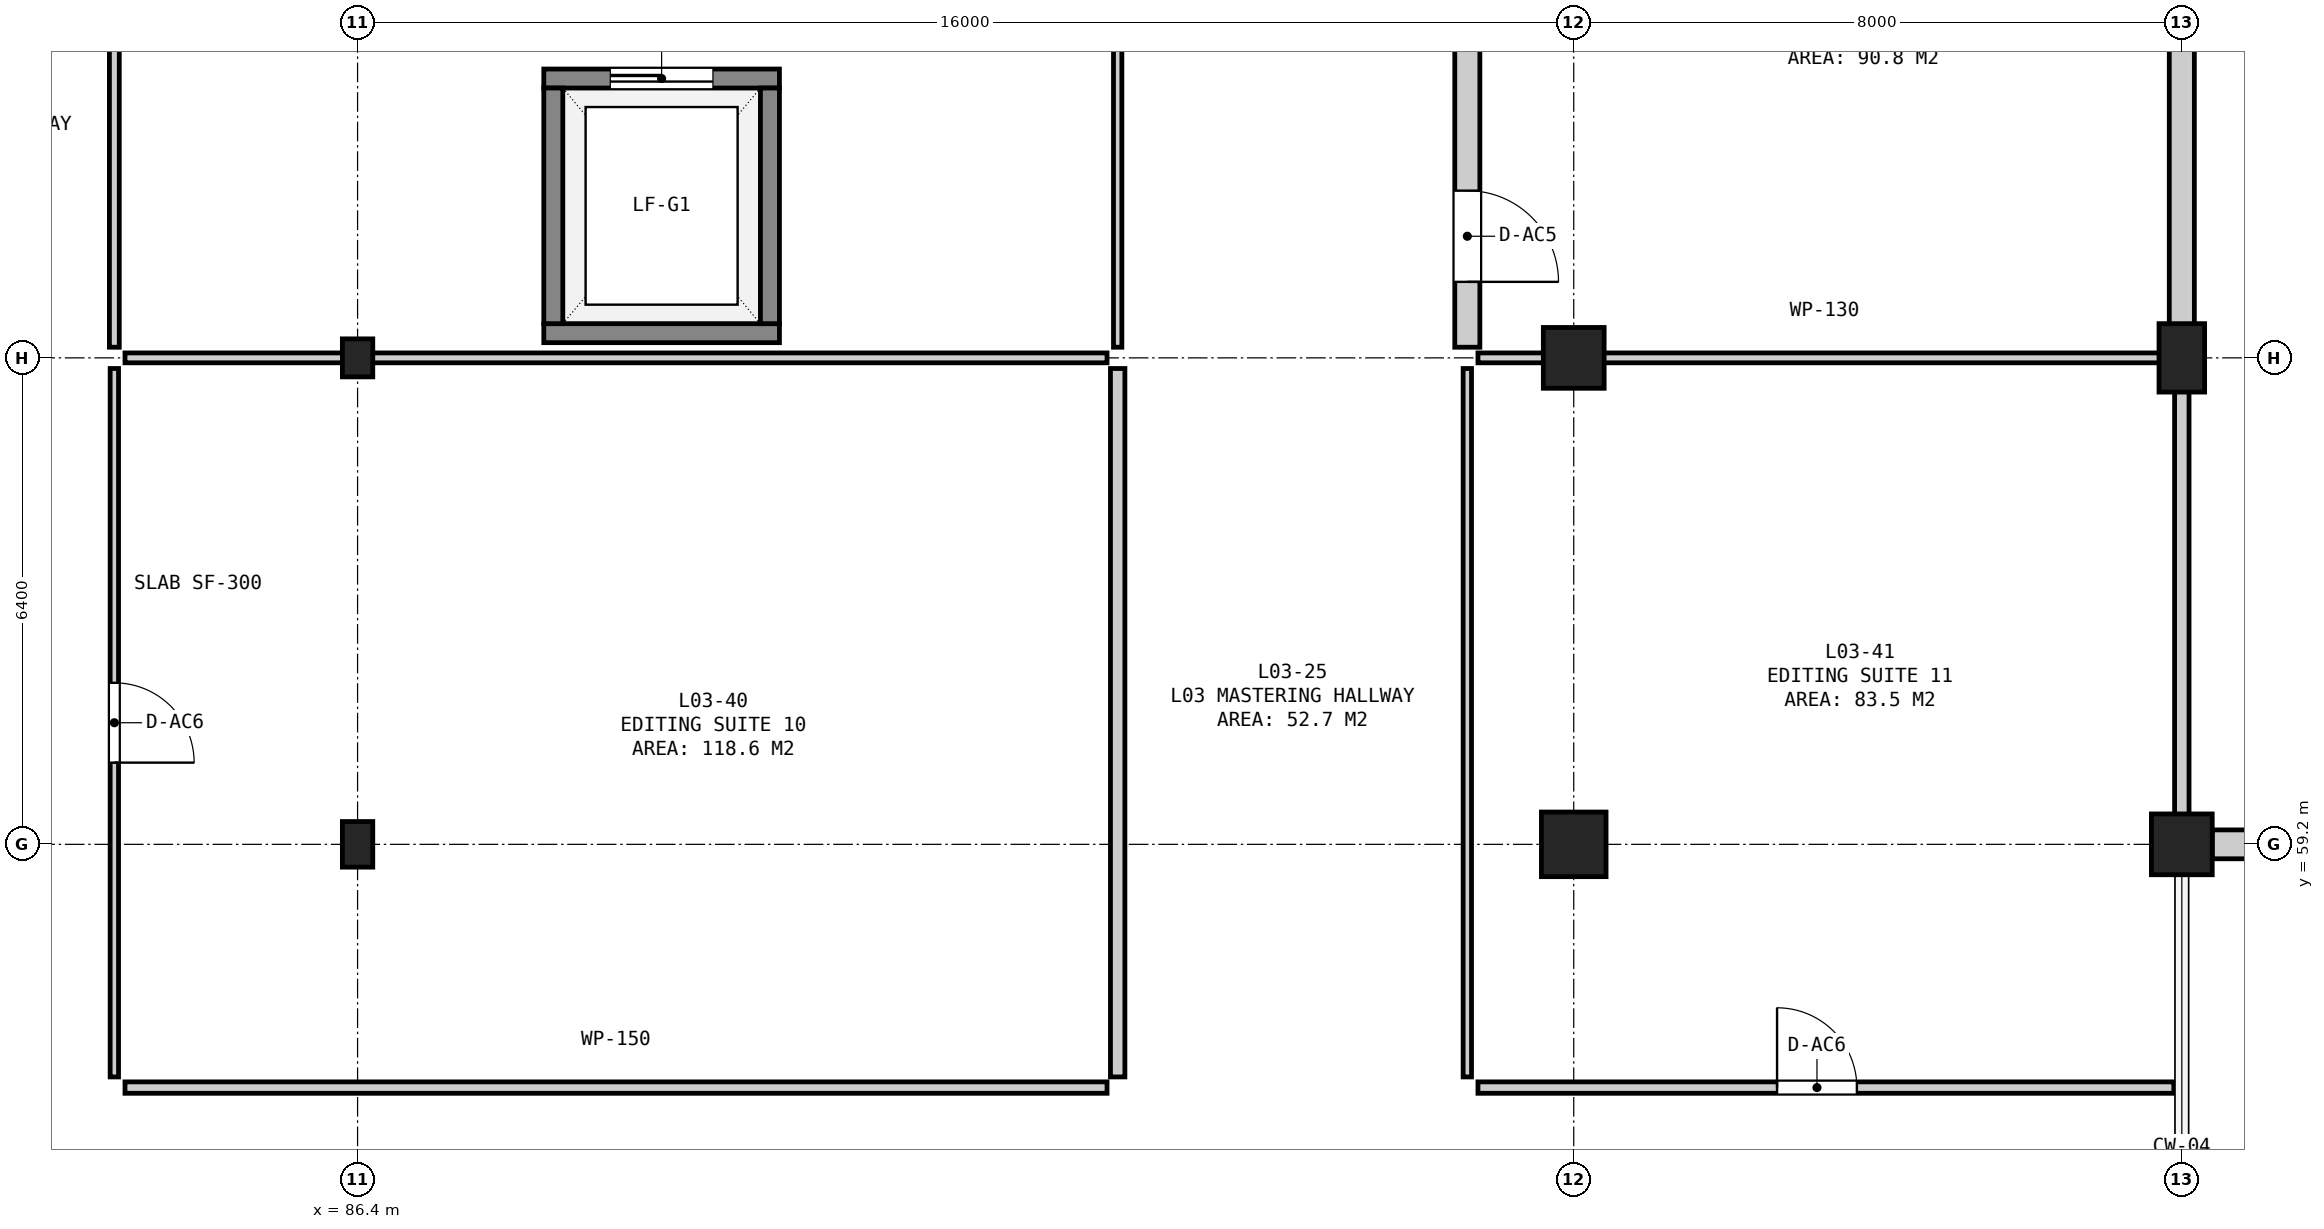
"""IFC4 building model, lengths in metres.
Left out: names, types, materials, properties, quantities, classifications, styles, units other than length and angle.
Written with IfcOpenShell. Run it as: python <this file> out.ifc"""

import sys

from ifc_helpers import new_model, si_unit, direction, frame, frame_2d, origin, origin_2d, place, context, subcontext, project, spatial, rectangle, extrude, element, fill, save


model = new_model("IFC4")
c1 = context("Model", 3, precision=1e-05, world=origin(), true_north=direction((0.0, 1.0)))
c2 = subcontext(c1, "Body", "Model", "MODEL_VIEW")
j1 = project(units=[si_unit("LENGTHUNIT", "METRE"), si_unit("PLANEANGLEUNIT", "RADIAN")], contexts=[c1])
p1 = place(None, origin())
s1 = spatial("IfcSite", under=j1, at=p1, CompositionType="ELEMENT")
p2 = place(p1, origin())
s2 = spatial("IfcBuilding", under=s1, at=p2, CompositionType="ELEMENT")
p3 = place(p2, frame((0.0, 0.0, 15.6)))
s3 = spatial("IfcBuildingStorey", under=s2, at=p3, CompositionType="ELEMENT", Elevation=15.6)
p4 = place(p3, frame((86.4, 59.2, 0.0), z_axis=(0.0, 0.0, 1.0), x_axis=(1.0, 0.0, 0.0)))
e1 = element("IfcColumn", 1, at=p4, inside=s3, PredefinedType="COLUMN", context=c2, shape_type="SweptSolid", body=[
    extrude(rectangle(XDim=0.4, YDim=0.6, at=origin_2d()), origin(), (0.0, 0.0, 1.0), 4.2),
])
p5 = place(p3, frame((86.4, 65.6, 0.0), z_axis=(0.0, 0.0, 1.0), x_axis=(1.0, 0.0, 0.0)))
e2 = element("IfcColumn", 2, at=p5, inside=s3, PredefinedType="COLUMN", context=c2, shape_type="SweptSolid", body=[
    extrude(rectangle(XDim=0.4, YDim=0.5, at=origin_2d()), origin(), (0.0, 0.0, 1.0), 4.2),
])
p6 = place(p3, frame((102.4, 59.2, 0.0), z_axis=(0.0, 0.0, 1.0), x_axis=(1.0, 0.0, 0.0)))
e3 = element("IfcColumn", 3, at=p6, inside=s3, PredefinedType="COLUMN", context=c2, shape_type="SweptSolid", body=[
    extrude(rectangle(XDim=0.85, YDim=0.85, at=origin_2d()), origin(), (0.0, 0.0, 1.0), 4.2),
])
for number, where, z_axis, x_axis in (
    (4, (102.4, 65.6, 0.0), (0.0, 0.0, 1.0), (1.0, 0.0, 0.0)),
    (5, (110.4, 59.2, 0.0), (0.0, 0.0, 1.0), (1.0, 0.0, 0.0)),
):
    element("IfcColumn", number, at=place(p3, frame(where, z_axis=z_axis, x_axis=x_axis)), inside=s3, PredefinedType="COLUMN", context=c2, shape_type="SweptSolid", body=[
        extrude(rectangle(XDim=0.8, YDim=0.8, at=origin_2d()), origin(), (0.0, 0.0, 1.0), 4.2),
    ])
p7 = place(p3, frame((110.4, 65.6, 0.0), z_axis=(0.0, 0.0, 1.0), x_axis=(1.0, 0.0, 0.0)))
e6 = element("IfcColumn", 6, at=p7, inside=s3, PredefinedType="COLUMN", context=c2, shape_type="SweptSolid", body=[
    extrude(rectangle(XDim=0.6, YDim=0.9, at=origin_2d()), origin(), (0.0, 0.0, 1.0), 4.2),
])
p8 = place(p3, frame((110.8, 59.2, 0.0), z_axis=(0.0, 0.0, 1.0), x_axis=(1.0, 0.0, 0.0)))
e7 = element("IfcWall", 7, at=p8, inside=s3, PredefinedType="SOLIDWALL", context=c2, shape_type="SweptSolid", body=[
    extrude(rectangle(XDim=5.625, YDim=0.38, at=frame_2d((2.812, 0.0))), origin(), (0.0, 0.0, 1.0), 3.3),
])
p9 = place(p8, frame((2.188, 0.0, 0.9)))
e8 = element("IfcOpeningElement", 8, at=p9, cuts=e7, PredefinedType="OPENING", context=c2, shape_type="SweptSolid", body=[
    extrude(rectangle(XDim=1.25, YDim=1.9, at=frame_2d((0.625, 0.95))), frame((0.0, 0.202, 0.0), z_axis=(0.0, -1.0, 0.0), x_axis=(1.0, 0.0, 0.0)), (0.0, 0.0, 1.0), 0.404),
])
p10 = place(p3, frame((88.85, 65.925, 0.0), z_axis=(0.0, 0.0, 1.0), x_axis=(1.0, 0.0, 0.0)))
e9 = element("IfcWall", 9, at=p10, inside=s3, PredefinedType="SHEAR", context=c2, shape_type="SweptSolid", body=[
    extrude(rectangle(XDim=3.1, YDim=0.25, at=frame_2d((1.55, 0.0))), origin(), (0.0, 0.0, 1.0), 3.9),
])
p11 = place(p3, frame((88.85, 69.275, 0.0), z_axis=(0.0, 0.0, 1.0), x_axis=(1.0, 0.0, 0.0)))
e10 = element("IfcWall", 10, at=p11, inside=s3, PredefinedType="SHEAR", context=c2, shape_type="SweptSolid", body=[
    extrude(rectangle(XDim=3.1, YDim=0.25, at=frame_2d((1.55, 0.0))), origin(), (0.0, 0.0, 1.0), 3.9),
])
p12 = place(p11, frame((0.875, 0.0, 0.0)))
e11 = element("IfcOpeningElement", 11, at=p12, cuts=e10, PredefinedType="OPENING", context=c2, shape_type="SweptSolid", body=[
    extrude(rectangle(XDim=1.35, YDim=2.2, at=frame_2d((0.675, 1.1))), frame((0.0, 0.137, 0.0), z_axis=(0.0, -1.0, 0.0), x_axis=(1.0, 0.0, 0.0)), (0.0, 0.0, 1.0), 0.274),
])
for number, where, z_axis, x_axis in (
    (12, (88.975, 66.05, 0.0), (0.0, 0.0, 1.0), (0.0, 1.0, 0.0)),
    (13, (91.825, 66.05, 0.0), (0.0, 0.0, 1.0), (0.0, 1.0, 0.0)),
):
    element("IfcWall", number, at=place(p3, frame(where, z_axis=z_axis, x_axis=x_axis)), inside=s3, PredefinedType="SHEAR", context=c2, shape_type="SweptSolid", body=[
        extrude(rectangle(XDim=3.1, YDim=0.25, at=frame_2d((1.55, 0.0))), origin(), (0.0, 0.0, 1.0), 3.9),
    ])
p13 = place(p3, frame((83.34, 56.0, 0.0), z_axis=(0.0, 0.0, 1.0), x_axis=(1.0, 0.0, 0.0)))
e14 = element("IfcWall", 14, at=p13, inside=s3, PredefinedType="PARTITIONING", context=c2, shape_type="SweptSolid", body=[
    extrude(rectangle(XDim=12.92, YDim=0.15, at=frame_2d((6.46, 0.0))), origin(), (0.0, 0.0, 1.0), 3.9),
])
p14 = place(p3, frame((83.34, 65.6, 0.0), z_axis=(0.0, 0.0, 1.0), x_axis=(1.0, 0.0, 0.0)))
e15 = element("IfcWall", 15, at=p14, inside=s3, PredefinedType="PARTITIONING", context=c2, shape_type="SweptSolid", body=[
    extrude(rectangle(XDim=12.92, YDim=0.13, at=frame_2d((6.46, 0.0))), origin(), (0.0, 0.0, 1.0), 2.745),
])
p15 = place(p3, frame((83.2, 56.14, 0.0), z_axis=(0.0, 0.0, 1.0), x_axis=(0.0, 1.0, 0.0)))
e16 = element("IfcWall", 16, at=p15, inside=s3, PredefinedType="PARTITIONING", context=c2, shape_type="SweptSolid", body=[
    extrude(rectangle(XDim=9.32, YDim=0.11, at=frame_2d((4.66, 0.0))), origin(), (0.0, 0.0, 1.0), 3.9),
])
p16 = place(p15, frame((4.135, 0.0, 0.0)))
e17 = element("IfcOpeningElement", 17, at=p16, cuts=e16, PredefinedType="OPENING", context=c2, shape_type="SweptSolid", body=[
    extrude(rectangle(XDim=1.05, YDim=2.15, at=frame_2d((0.525, 1.075))), frame((0.0, 0.067, 0.0), z_axis=(0.0, -1.0, 0.0), x_axis=(1.0, 0.0, 0.0)), (0.0, 0.0, 1.0), 0.134),
])
p17 = place(p3, frame((96.4, 56.14, 0.0), z_axis=(0.0, 0.0, 1.0), x_axis=(0.0, 1.0, 0.0)))
e18 = element("IfcWall", 18, at=p17, inside=s3, PredefinedType="PARTITIONING", context=c2, shape_type="SweptSolid", body=[
    extrude(rectangle(XDim=9.32, YDim=0.19, at=frame_2d((4.66, 0.0))), origin(), (0.0, 0.0, 1.0), 3.9),
])
p18 = place(p3, frame((101.14, 56.0, 0.0), z_axis=(0.0, 0.0, 1.0), x_axis=(1.0, 0.0, 0.0)))
e19 = element("IfcWall", 19, at=p18, inside=s3, PredefinedType="PARTITIONING", context=c2, shape_type="SweptSolid", body=[
    extrude(rectangle(XDim=9.155, YDim=0.15, at=frame_2d((4.578, 0.0))), origin(), (0.0, 0.0, 1.0), 3.9),
])
p19 = place(p18, frame((3.935, 0.0, 0.0)))
e20 = element("IfcOpeningElement", 20, at=p19, cuts=e19, PredefinedType="OPENING", context=c2, shape_type="SweptSolid", body=[
    extrude(rectangle(XDim=1.05, YDim=2.15, at=frame_2d((0.525, 1.075))), frame((0.0, 0.087, 0.0), z_axis=(0.0, -1.0, 0.0), x_axis=(1.0, 0.0, 0.0)), (0.0, 0.0, 1.0), 0.174),
])
p20 = place(p3, frame((101.14, 65.6, 0.0), z_axis=(0.0, 0.0, 1.0), x_axis=(1.0, 0.0, 0.0)))
e21 = element("IfcWall", 21, at=p20, inside=s3, PredefinedType="PARTITIONING", context=c2, shape_type="SweptSolid", body=[
    extrude(rectangle(XDim=9.12, YDim=0.13, at=frame_2d((4.56, 0.0))), origin(), (0.0, 0.0, 1.0), 2.745),
])
p21 = place(p3, frame((101.0, 56.14, 0.0), z_axis=(0.0, 0.0, 1.0), x_axis=(0.0, 1.0, 0.0)))
e22 = element("IfcWall", 22, at=p21, inside=s3, PredefinedType="PARTITIONING", context=c2, shape_type="SweptSolid", body=[
    extrude(rectangle(XDim=9.32, YDim=0.11, at=frame_2d((4.66, 0.0))), origin(), (0.0, 0.0, 1.0), 3.9),
])
p22 = place(p3, frame((110.4, 58.94, 0.0), z_axis=(0.0, 0.0, 1.0), x_axis=(0.0, 1.0, 0.0)))
e23 = element("IfcWall", 23, at=p22, inside=s3, PredefinedType="PARTITIONING", context=c2, shape_type="SweptSolid", body=[
    extrude(rectangle(XDim=6.52, YDim=0.19, at=frame_2d((3.26, 0.0))), origin(), (0.0, 0.0, 1.0), 3.195),
])
p23 = place(p3, frame((83.2, 65.74, 0.0), z_axis=(0.0, 0.0, 1.0), x_axis=(0.0, 1.0, 0.0)))
e24 = element("IfcWall", 24, at=p23, inside=s3, PredefinedType="PARTITIONING", context=c2, shape_type="SweptSolid", body=[
    extrude(rectangle(XDim=10.12, YDim=0.13, at=frame_2d((5.06, 0.0))), origin(), (0.0, 0.0, 1.0), 3.9),
])
p24 = place(p23, frame((6.535, 0.0, 0.0)))
e25 = element("IfcOpeningElement", 25, at=p24, cuts=e24, PredefinedType="OPENING", context=c2, shape_type="SweptSolid", body=[
    extrude(rectangle(XDim=1.05, YDim=2.15, at=frame_2d((0.525, 1.075))), frame((0.0, 0.077, 0.0), z_axis=(0.0, -1.0, 0.0), x_axis=(1.0, 0.0, 0.0)), (0.0, 0.0, 1.0), 0.154),
])
p25 = place(p3, frame((96.4, 65.74, 0.0), z_axis=(0.0, 0.0, 1.0), x_axis=(0.0, 1.0, 0.0)))
e26 = element("IfcWall", 26, at=p25, inside=s3, PredefinedType="PARTITIONING", context=c2, shape_type="SweptSolid", body=[
    extrude(rectangle(XDim=10.12, YDim=0.11, at=frame_2d((5.06, 0.0))), origin(), (0.0, 0.0, 1.0), 3.9),
])
p26 = place(p3, frame((101.0, 65.74, 0.0), z_axis=(0.0, 0.0, 1.0), x_axis=(0.0, 1.0, 0.0)))
e27 = element("IfcWall", 27, at=p26, inside=s3, PredefinedType="SOLIDWALL", context=c2, shape_type="SweptSolid", body=[
    extrude(rectangle(XDim=10.12, YDim=0.33, at=frame_2d((5.06, 0.0))), origin(), (0.0, 0.0, 1.0), 3.9),
])
p27 = place(p26, frame((0.86, 0.0, 0.0)))
e28 = element("IfcOpeningElement", 28, at=p27, cuts=e27, PredefinedType="OPENING", context=c2, shape_type="SweptSolid", body=[
    extrude(rectangle(XDim=1.2, YDim=2.2, at=frame_2d((0.6, 1.1))), frame((0.0, 0.177, 0.0), z_axis=(0.0, -1.0, 0.0), x_axis=(1.0, 0.0, 0.0)), (0.0, 0.0, 1.0), 0.354),
])
p28 = place(p3, frame((110.4, 65.74, 0.0), z_axis=(0.0, 0.0, 1.0), x_axis=(0.0, 1.0, 0.0)))
e29 = element("IfcWall", 29, at=p28, inside=s3, PredefinedType="SOLIDWALL", context=c2, shape_type="SweptSolid", body=[
    extrude(rectangle(XDim=10.12, YDim=0.33, at=frame_2d((5.06, 0.0))), origin(), (0.0, 0.0, 1.0), 3.245),
])
p29 = place(p12, origin())
e30 = element("IfcDoor", 30, at=p29, inside=s3, OperationType="SLIDING_TO_LEFT", PredefinedType="DOOR", context=c2, shape_type="SweptSolid", body=[
    extrude(rectangle(XDim=1.35, YDim=2.2, at=frame_2d((0.675, 1.1))), frame((0.0, 0.025, 0.0), z_axis=(0.0, -1.0, 0.0), x_axis=(1.0, 0.0, 0.0)), (0.0, 0.0, 1.0), 0.05),
])
fill(e11, e30)
p30 = place(p16, frame((1.05, 0.0, 0.0), z_axis=(0.0, 0.0, 1.0), x_axis=(-1.0, 0.0, 0.0)))
e31 = element("IfcDoor", 31, at=p30, inside=s3, OperationType="SINGLE_SWING_RIGHT", PredefinedType="DOOR", context=c2, shape_type="SweptSolid", body=[
    extrude(rectangle(XDim=1.05, YDim=2.15, at=frame_2d((0.525, 1.075))), frame((0.0, 0.025, 0.0), z_axis=(0.0, -1.0, 0.0), x_axis=(1.0, 0.0, 0.0)), (0.0, 0.0, 1.0), 0.05),
])
fill(e17, e31)
p31 = place(p19, origin())
e32 = element("IfcDoor", 32, at=p31, inside=s3, OperationType="SINGLE_SWING_LEFT", PredefinedType="DOOR", context=c2, shape_type="SweptSolid", body=[
    extrude(rectangle(XDim=1.05, YDim=2.15, at=frame_2d((0.525, 1.075))), frame((0.0, 0.025, 0.0), z_axis=(0.0, -1.0, 0.0), x_axis=(1.0, 0.0, 0.0)), (0.0, 0.0, 1.0), 0.05),
])
fill(e20, e32)
p32 = place(p27, frame((1.2, 0.0, 0.0), z_axis=(0.0, 0.0, 1.0), x_axis=(-1.0, 0.0, 0.0)))
e33 = element("IfcDoor", 33, at=p32, inside=s3, OperationType="SINGLE_SWING_RIGHT", PredefinedType="DOOR", context=c2, shape_type="SweptSolid", body=[
    extrude(rectangle(XDim=1.2, YDim=2.2, at=frame_2d((0.6, 1.1))), frame((0.0, 0.025, 0.0), z_axis=(0.0, -1.0, 0.0), x_axis=(1.0, 0.0, 0.0)), (0.0, 0.0, 1.0), 0.05),
])
fill(e28, e33)
save(model, sys.argv[1])
